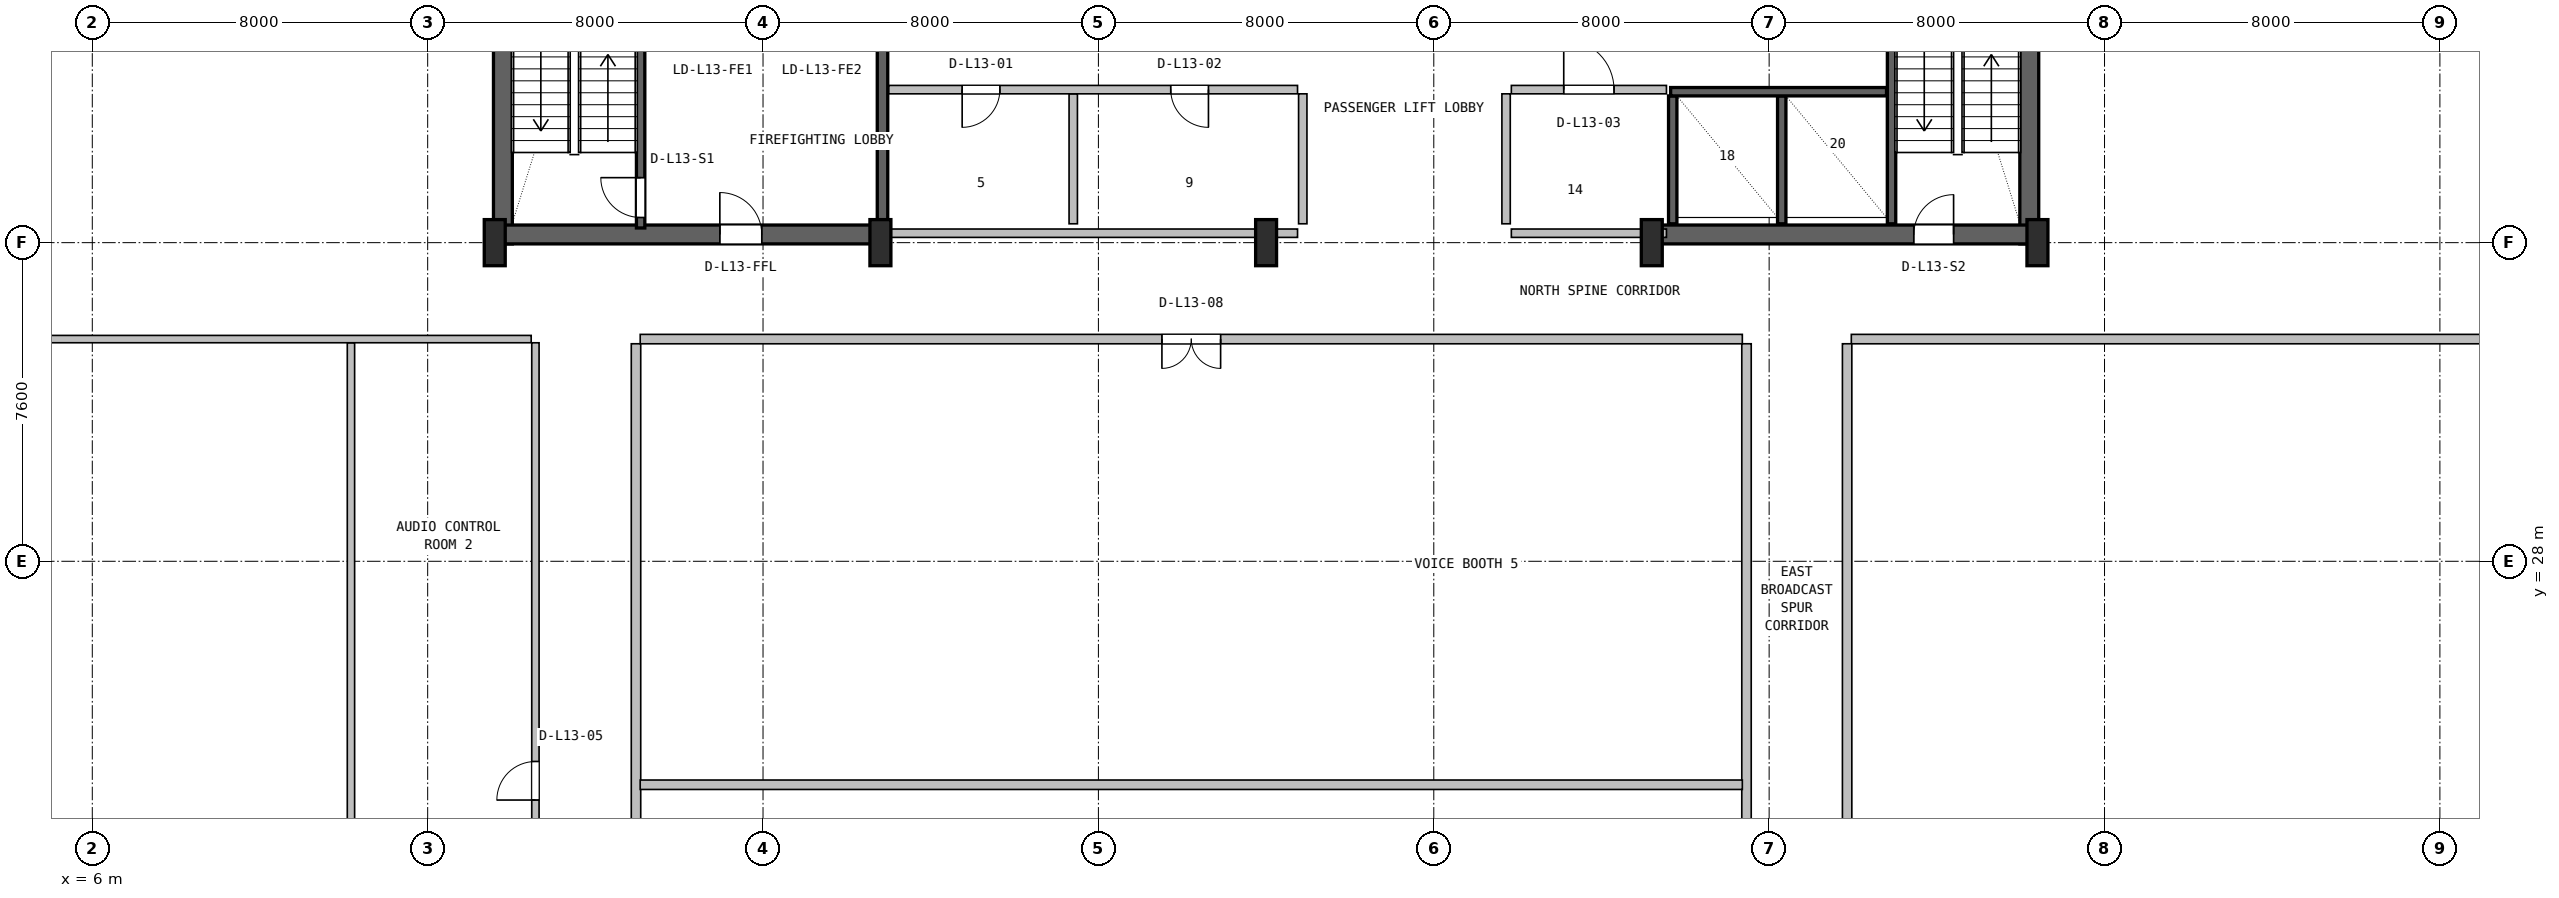
"""IFC4 building model, lengths in metres.
Left out: names, types, materials, properties, quantities, classifications, styles, units other than length and angle.
Written with IfcOpenShell. Run it as: python <this file> out.ifc"""

import sys

from ifc_helpers import new_model, si_unit, direction, frame, frame_2d, origin, origin_2d, place, context, subcontext, project, spatial, rectangle, i_section, extrude, source, transform, mapped, element, fill, save


model = new_model("IFC4")
c1 = context("Model", 3, precision=1e-05, world=origin(), true_north=direction((0.0, 1.0)))
c2 = subcontext(c1, "Body", "Model", "MODEL_VIEW")
j1 = project(units=[si_unit("LENGTHUNIT", "METRE"), si_unit("PLANEANGLEUNIT", "RADIAN")], contexts=[c1])
p1 = place(None, origin())
s1 = spatial("IfcSite", under=j1, at=p1, CompositionType="ELEMENT")
p2 = place(p1, origin())
s2 = spatial("IfcBuilding", under=s1, at=p2, CompositionType="ELEMENT")
p3 = place(p2, frame((0.0, 0.0, 58.8)))
s3 = spatial("IfcBuildingStorey", under=s2, at=p3, CompositionType="ELEMENT", Elevation=58.8)
for number, where, z_axis, x_axis in (
    (1, (15.795, 35.57, 0.0), (0.0, 0.0, 1.0), (0.0, 1.0, 0.0)),
    (2, (52.205, 35.57, 0.0), (0.0, 0.0, 1.0), (0.0, 1.0, 0.0)),
):
    element("IfcWall", number, at=place(p3, frame(where, z_axis=z_axis, x_axis=x_axis)), inside=s3, PredefinedType="SHEAR", context=c2, shape_type="SweptSolid", body=[
        extrude(rectangle(XDim=11.23, YDim=0.45, at=frame_2d((5.615, 0.0))), origin(), (0.0, 0.0, 1.0), 3.65),
    ])
p4 = place(p3, frame((15.57, 35.795, 0.0), z_axis=(0.0, 0.0, 1.0), x_axis=(1.0, 0.0, 0.0)))
e3 = element("IfcWall", 3, at=p4, inside=s3, PredefinedType="SHEAR", context=c2, shape_type="SweptSolid", body=[
    extrude(rectangle(XDim=9.23, YDim=0.45, at=frame_2d((4.615, 0.0))), origin(), (0.0, 0.0, 1.0), 3.65),
])
p5 = place(p4, frame((5.4, 0.0, 0.0)))
e4 = element("IfcOpeningElement", 4, at=p5, cuts=e3, PredefinedType="OPENING", context=c2, shape_type="SweptSolid", body=[
    extrude(rectangle(XDim=1.0, YDim=2.1, at=frame_2d((0.5, 1.05))), frame((0.0, 0.235, 0.0), z_axis=(0.0, -1.0, 0.0), x_axis=(1.0, 0.0, 0.0)), (0.0, 0.0, 1.0), 0.47),
])
p6 = place(p3, frame((43.2, 35.795, 0.0), z_axis=(0.0, 0.0, 1.0), x_axis=(1.0, 0.0, 0.0)))
e5 = element("IfcWall", 5, at=p6, inside=s3, PredefinedType="SHEAR", context=c2, shape_type="SweptSolid", body=[
    extrude(rectangle(XDim=9.23, YDim=0.45, at=frame_2d((4.615, 0.0))), origin(), (0.0, 0.0, 1.0), 3.65),
])
p7 = place(p6, frame((6.25, 0.0, 0.0)))
e6 = element("IfcOpeningElement", 6, at=p7, cuts=e5, PredefinedType="OPENING", context=c2, shape_type="SweptSolid", body=[
    extrude(rectangle(XDim=0.95, YDim=2.1, at=frame_2d((0.475, 1.05))), frame((0.0, 0.235, 0.0), z_axis=(0.0, -1.0, 0.0), x_axis=(1.0, 0.0, 0.0)), (0.0, 0.0, 1.0), 0.47),
])
m1 = source(origin(), c2, "Body", "SweptSolid", [
    extrude(i_section(OverallWidth=0.5, OverallDepth=1.1, WebThickness=0.018, FlangeThickness=0.032, FilletRadius=0.018, at=origin_2d()), origin(), (0.0, 0.0, 1.0), 3.9),
])
for number, where, z_axis, x_axis in (
    (7, (15.6, 35.6, 0.0), (0.0, 0.0, 1.0), (1.0, 0.0, 0.0)),
    (8, (24.8, 35.6, 0.0), (0.0, 0.0, 1.0), (1.0, 0.0, 0.0)),
    (9, (34.0, 35.6, 0.0), (0.0, 0.0, 1.0), (1.0, 0.0, 0.0)),
    (10, (43.2, 35.6, 0.0), (0.0, 0.0, 1.0), (1.0, 0.0, 0.0)),
    (11, (52.4, 35.6, 0.0), (0.0, 0.0, 1.0), (1.0, 0.0, 0.0)),
):
    element("IfcColumn", number, at=place(p3, frame(where, z_axis=z_axis, x_axis=x_axis)), inside=s3, PredefinedType="COLUMN", context=c2, shape_type="MappedRepresentation", body=[
        mapped(m1, transform((0.0, 0.0, 0.0), x_axis=(1.0, 0.0, 0.0), y_axis=(0.0, 1.0, 0.0), z_axis=(0.0, 0.0, 1.0), scale=1.0)),
    ])
p8 = place(p3, frame((19.08, 35.95, 0.0), z_axis=(0.0, 0.0, 1.0), x_axis=(0.0, 1.0, 0.0)))
e12 = element("IfcWall", 12, at=p8, inside=s3, PredefinedType="SHEAR", context=c2, shape_type="SweptSolid", body=[
    extrude(rectangle(XDim=9.65, YDim=0.2, at=frame_2d((4.825, 0.0))), origin(), (0.0, 0.0, 1.0), 3.65),
])
p9 = place(p8, frame((0.25, 0.0, 0.0)))
e13 = element("IfcOpeningElement", 13, at=p9, cuts=e12, PredefinedType="OPENING", context=c2, shape_type="SweptSolid", body=[
    extrude(rectangle(XDim=0.95, YDim=2.1, at=frame_2d((0.475, 1.05))), frame((0.0, 0.11, 0.0), z_axis=(0.0, -1.0, 0.0), x_axis=(1.0, 0.0, 0.0)), (0.0, 0.0, 1.0), 0.22),
])
p10 = place(p3, frame((24.85, 36.05, 0.0), z_axis=(0.0, 0.0, 1.0), x_axis=(0.0, 1.0, 0.0)))
e14 = element("IfcWall", 14, at=p10, inside=s3, PredefinedType="SHEAR", context=c2, shape_type="SweptSolid", body=[
    extrude(rectangle(XDim=10.45, YDim=0.25, at=frame_2d((5.225, 0.0))), origin(), (0.0, 0.0, 1.0), 3.65),
])
p11 = place(p3, frame((48.92, 36.05, 0.0), z_axis=(0.0, 0.0, 1.0), x_axis=(0.0, 1.0, 0.0)))
e15 = element("IfcWall", 15, at=p11, inside=s3, PredefinedType="SHEAR", context=c2, shape_type="SweptSolid", body=[
    extrude(rectangle(XDim=10.5, YDim=0.2, at=frame_2d((5.25, 0.0))), origin(), (0.0, 0.0, 1.0), 3.65),
])
for number, where, z_axis, x_axis in (
    (16, (43.7, 36.05, 0.0), (0.0, 0.0, 1.0), (0.0, 1.0, 0.0)),
    (17, (46.3, 36.05, 0.0), (0.0, 0.0, 1.0), (0.0, 1.0, 0.0)),
):
    element("IfcWall", number, at=place(p3, frame(where, z_axis=z_axis, x_axis=x_axis)), inside=s3, PredefinedType="SHEAR", context=c2, shape_type="SweptSolid", body=[
        extrude(rectangle(XDim=3.05, YDim=0.2, at=frame_2d((1.525, 0.0))), origin(), (0.0, 0.0, 1.0), 3.65),
    ])
p12 = place(p3, frame((43.65, 39.2, 0.0), z_axis=(0.0, 0.0, 1.0), x_axis=(1.0, 0.0, 0.0)))
e18 = element("IfcWall", 18, at=p12, inside=s3, PredefinedType="SHEAR", context=c2, shape_type="SweptSolid", body=[
    extrude(rectangle(XDim=5.15, YDim=0.2, at=frame_2d((2.575, 0.0))), origin(), (0.0, 0.0, 1.0), 3.65),
])
p13 = place(p3, frame((25.0, 35.825, 0.0), z_axis=(0.0, 0.0, 1.0), x_axis=(1.0, 0.0, 0.0)))
e19 = element("IfcWall", 19, at=p13, inside=s3, PredefinedType="PLUMBINGWALL", context=c2, shape_type="SweptSolid", body=[
    extrude(rectangle(XDim=9.75, YDim=0.2, at=frame_2d((4.875, 0.0))), origin(), (0.0, 0.0, 1.0), 2.425),
])
p14 = place(p3, frame((29.4, 36.05, 0.0), z_axis=(0.0, 0.0, 1.0), x_axis=(0.0, 1.0, 0.0)))
e20 = element("IfcWall", 20, at=p14, inside=s3, PredefinedType="PLUMBINGWALL", context=c2, shape_type="SweptSolid", body=[
    extrude(rectangle(XDim=3.1, YDim=0.2, at=frame_2d((1.55, 0.0))), origin(), (0.0, 0.0, 1.0), 3.63),
])
p15 = place(p3, frame((25.0, 39.25, 0.0), z_axis=(0.0, 0.0, 1.0), x_axis=(1.0, 0.0, 0.0)))
e21 = element("IfcWall", 21, at=p15, inside=s3, PredefinedType="PLUMBINGWALL", context=c2, shape_type="SweptSolid", body=[
    extrude(rectangle(XDim=9.75, YDim=0.2, at=frame_2d((4.875, 0.0))), origin(), (0.0, 0.0, 1.0), 3.63),
])
p16 = place(p15, frame((1.75, 0.0, 0.0)))
e22 = element("IfcOpeningElement", 22, at=p16, cuts=e21, PredefinedType="OPENING", context=c2, shape_type="SweptSolid", body=[
    extrude(rectangle(XDim=0.9, YDim=2.06, at=frame_2d((0.45, 1.03))), frame((0.0, 0.11, 0.0), z_axis=(0.0, -1.0, 0.0), x_axis=(1.0, 0.0, 0.0)), (0.0, 0.0, 1.0), 0.22),
])
p17 = place(p15, frame((6.725, 0.0, 0.0)))
e23 = element("IfcOpeningElement", 23, at=p17, cuts=e21, PredefinedType="OPENING", context=c2, shape_type="SweptSolid", body=[
    extrude(rectangle(XDim=0.9, YDim=2.06, at=frame_2d((0.45, 1.03))), frame((0.0, 0.11, 0.0), z_axis=(0.0, -1.0, 0.0), x_axis=(1.0, 0.0, 0.0)), (0.0, 0.0, 1.0), 0.22),
])
p18 = place(p3, frame((34.875, 36.05, 0.0), z_axis=(0.0, 0.0, 1.0), x_axis=(0.0, 1.0, 0.0)))
e24 = element("IfcWall", 24, at=p18, inside=s3, PredefinedType="PLUMBINGWALL", context=c2, shape_type="SweptSolid", body=[
    extrude(rectangle(XDim=3.1, YDim=0.2, at=frame_2d((1.55, 0.0))), origin(), (0.0, 0.0, 1.0), 3.63),
])
p19 = place(p3, frame((39.85, 35.825, 0.0), z_axis=(0.0, 0.0, 1.0), x_axis=(1.0, 0.0, 0.0)))
e25 = element("IfcWall", 25, at=p19, inside=s3, PredefinedType="SOLIDWALL", context=c2, shape_type="SweptSolid", body=[
    extrude(rectangle(XDim=3.7, YDim=0.2, at=frame_2d((1.85, 0.0))), origin(), (0.0, 0.0, 1.0), 2.425),
])
p20 = place(p3, frame((39.85, 39.25, 0.0), z_axis=(0.0, 0.0, 1.0), x_axis=(1.0, 0.0, 0.0)))
e26 = element("IfcWall", 26, at=p20, inside=s3, PredefinedType="SOLIDWALL", context=c2, shape_type="SweptSolid", body=[
    extrude(rectangle(XDim=3.7, YDim=0.2, at=frame_2d((1.85, 0.0))), origin(), (0.0, 0.0, 1.0), 3.63),
])
p21 = place(p20, frame((1.25, 0.0, 0.0)))
e27 = element("IfcOpeningElement", 27, at=p21, cuts=e26, PredefinedType="OPENING", context=c2, shape_type="SweptSolid", body=[
    extrude(rectangle(XDim=1.2, YDim=2.1, at=frame_2d((0.6, 1.05))), frame((0.0, 0.11, 0.0), z_axis=(0.0, -1.0, 0.0), x_axis=(1.0, 0.0, 0.0)), (0.0, 0.0, 1.0), 0.22),
])
p22 = place(p3, frame((39.725, 36.05, 0.0), z_axis=(0.0, 0.0, 1.0), x_axis=(0.0, 1.0, 0.0)))
e28 = element("IfcWall", 28, at=p22, inside=s3, PredefinedType="SOLIDWALL", context=c2, shape_type="SweptSolid", body=[
    extrude(rectangle(XDim=3.1, YDim=0.2, at=frame_2d((1.55, 0.0))), origin(), (0.0, 0.0, 1.0), 3.63),
])
p23 = place(p3, frame((16.57, 1.38, 0.0), z_axis=(0.0, 0.0, 1.0), x_axis=(0.0, 1.0, 0.0)))
e29 = element("IfcWall", 29, at=p23, inside=s3, PredefinedType="PARTITIONING", context=c2, shape_type="SweptSolid", body=[
    extrude(rectangle(XDim=31.832, YDim=0.175, at=frame_2d((15.916, 0.0))), origin(), (0.0, 0.0, 1.0), 3.208),
])
p24 = place(p23, frame((5.38, 0.0, 0.0)))
e30 = element("IfcOpeningElement", 30, at=p24, cuts=e29, PredefinedType="OPENING", context=c2, shape_type="SweptSolid", body=[
    extrude(rectangle(XDim=1.05, YDim=2.1, at=frame_2d((0.525, 1.05))), frame((0.0, 0.098, 0.0), z_axis=(0.0, -1.0, 0.0), x_axis=(1.0, 0.0, 0.0)), (0.0, 0.0, 1.0), 0.195),
])
p25 = place(p23, frame((20.925, 0.0, 0.0)))
e31 = element("IfcOpeningElement", 31, at=p25, cuts=e29, PredefinedType="OPENING", context=c2, shape_type="SweptSolid", body=[
    extrude(rectangle(XDim=0.92, YDim=2.08, at=frame_2d((0.46, 1.04))), frame((0.0, 0.098, 0.0), z_axis=(0.0, -1.0, 0.0), x_axis=(1.0, 0.0, 0.0)), (0.0, 0.0, 1.0), 0.195),
])
p26 = place(p3, frame((12.17, 12.218, 0.0), z_axis=(0.0, 0.0, 1.0), x_axis=(0.0, 1.0, 0.0)))
e32 = element("IfcWall", 32, at=p26, inside=s3, PredefinedType="PARTITIONING", context=c2, shape_type="SweptSolid", body=[
    extrude(rectangle(XDim=20.994, YDim=0.175, at=frame_2d((10.497, 0.0))), origin(), (0.0, 0.0, 1.0), 3.322),
])
p27 = place(p3, frame((2.18, 33.3, 0.0), z_axis=(0.0, 0.0, 1.0), x_axis=(1.0, 0.0, 0.0)))
e33 = element("IfcWall", 33, at=p27, inside=s3, PredefinedType="PARTITIONING", context=c2, shape_type="SweptSolid", body=[
    extrude(rectangle(XDim=14.29, YDim=0.175, at=frame_2d((7.145, 0.0))), origin(), (0.0, 0.0, 1.0), 3.208),
])
p28 = place(p3, frame((45.46, 1.38, 0.0), z_axis=(0.0, 0.0, 1.0), x_axis=(0.0, 1.0, 0.0)))
e34 = element("IfcWall", 34, at=p28, inside=s3, PredefinedType="PARTITIONING", context=c2, shape_type="SweptSolid", body=[
    extrude(rectangle(XDim=31.808, YDim=0.225, at=frame_2d((15.904, 0.0))), origin(), (0.0, 0.0, 1.0), 3.208),
])
p29 = place(p28, frame((6.8, 0.0, 0.0)))
e35 = element("IfcOpeningElement", 35, at=p29, cuts=e34, PredefinedType="OPENING", context=c2, shape_type="SweptSolid", body=[
    extrude(rectangle(XDim=1.4, YDim=2.12, at=frame_2d((0.7, 1.06))), frame((0.0, 0.123, 0.0), z_axis=(0.0, -1.0, 0.0), x_axis=(1.0, 0.0, 0.0)), (0.0, 0.0, 1.0), 0.245),
])
p30 = place(p28, frame((17.015, 0.0, 0.0)))
e36 = element("IfcOpeningElement", 36, at=p30, cuts=e34, PredefinedType="OPENING", context=c2, shape_type="SweptSolid", body=[
    extrude(rectangle(XDim=1.4, YDim=2.12, at=frame_2d((0.7, 1.06))), frame((0.0, 0.123, 0.0), z_axis=(0.0, -1.0, 0.0), x_axis=(1.0, 0.0, 0.0)), (0.0, 0.0, 1.0), 0.245),
])
p31 = place(p3, frame((18.97, 1.38, 0.0), z_axis=(0.0, 0.0, 1.0), x_axis=(0.0, 1.0, 0.0)))
e37 = element("IfcWall", 37, at=p31, inside=s3, PredefinedType="PARTITIONING", context=c2, shape_type="SweptSolid", body=[
    extrude(rectangle(XDim=31.808, YDim=0.225, at=frame_2d((15.904, 0.0))), origin(), (0.0, 0.0, 1.0), 3.208),
])
p32 = place(p3, frame((19.07, 22.67, 0.0), z_axis=(0.0, 0.0, 1.0), x_axis=(1.0, 0.0, 0.0)))
e38 = element("IfcWall", 38, at=p32, inside=s3, PredefinedType="PARTITIONING", context=c2, shape_type="SweptSolid", body=[
    extrude(rectangle(XDim=26.29, YDim=0.225, at=frame_2d((13.145, 0.0))), origin(), (0.0, 0.0, 1.0), 2.852),
])
p33 = place(p3, frame((19.07, 33.3, 0.0), z_axis=(0.0, 0.0, 1.0), x_axis=(1.0, 0.0, 0.0)))
e39 = element("IfcWall", 39, at=p33, inside=s3, PredefinedType="PARTITIONING", context=c2, shape_type="SweptSolid", body=[
    extrude(rectangle(XDim=26.29, YDim=0.225, at=frame_2d((13.145, 0.0))), origin(), (0.0, 0.0, 1.0), 2.852),
])
p34 = place(p33, frame((12.445, 0.0, 0.0)))
e40 = element("IfcOpeningElement", 40, at=p34, cuts=e39, PredefinedType="OPENING", context=c2, shape_type="SweptSolid", body=[
    extrude(rectangle(XDim=1.4, YDim=2.12, at=frame_2d((0.7, 1.06))), frame((0.0, 0.123, 0.0), z_axis=(0.0, -1.0, 0.0), x_axis=(1.0, 0.0, 0.0)), (0.0, 0.0, 1.0), 0.245),
])
p35 = place(p3, frame((47.96, 33.3, 0.0), z_axis=(0.0, 0.0, 1.0), x_axis=(1.0, 0.0, 0.0)))
e41 = element("IfcWall", 41, at=p35, inside=s3, PredefinedType="PARTITIONING", context=c2, shape_type="SweptSolid", body=[
    extrude(rectangle(XDim=17.86, YDim=0.225, at=frame_2d((8.93, 0.0))), origin(), (0.0, 0.0, 1.0), 3.208),
])
p36 = place(p3, frame((47.86, 2.55, 0.0), z_axis=(0.0, 0.0, 1.0), x_axis=(0.0, 1.0, 0.0)))
e42 = element("IfcWall", 42, at=p36, inside=s3, PredefinedType="PARTITIONING", context=c2, shape_type="SweptSolid", body=[
    extrude(rectangle(XDim=30.638, YDim=0.225, at=frame_2d((15.319, 0.0))), origin(), (0.0, 0.0, 1.0), 3.322),
])
p37 = place(p36, frame((14.859, 0.0, 0.0)))
e43 = element("IfcOpeningElement", 43, at=p37, cuts=e42, PredefinedType="OPENING", context=c2, shape_type="SweptSolid", body=[
    extrude(rectangle(XDim=0.92, YDim=2.08, at=frame_2d((0.46, 1.04))), frame((0.0, 0.123, 0.0), z_axis=(0.0, -1.0, 0.0), x_axis=(1.0, 0.0, 0.0)), (0.0, 0.0, 1.0), 0.245),
])
m2 = source(origin(), c2, "Body", "SweptSolid", [
    extrude(rectangle(XDim=0.95, YDim=2.1, at=frame_2d((0.475, 1.05))), frame((0.0, 0.025, 0.0), z_axis=(0.0, -1.0, 0.0), x_axis=(1.0, 0.0, 0.0)), (0.0, 0.0, 1.0), 0.05),
])
p38 = place(p9, origin())
e44 = element("IfcDoor", 44, at=p38, inside=s3, OperationType="SINGLE_SWING_RIGHT", PredefinedType="DOOR", context=c2, shape_type="MappedRepresentation", body=[
    mapped(m2, transform((0.0, 0.0, 0.0), x_axis=(1.0, 0.0, 0.0), y_axis=(0.0, 1.0, 0.0), z_axis=(0.0, 0.0, 1.0), scale=1.0)),
])
fill(e13, e44)
m3 = source(origin(), c2, "Body", "SweptSolid", [
    extrude(rectangle(XDim=1.0, YDim=2.1, at=frame_2d((0.5, 1.05))), frame((0.0, 0.025, 0.0), z_axis=(0.0, -1.0, 0.0), x_axis=(1.0, 0.0, 0.0)), (0.0, 0.0, 1.0), 0.05),
])
p39 = place(p5, origin())
e45 = element("IfcDoor", 45, at=p39, inside=s3, OperationType="SINGLE_SWING_LEFT", PredefinedType="DOOR", context=c2, shape_type="MappedRepresentation", body=[
    mapped(m3, transform((0.0, 0.0, 0.0), x_axis=(1.0, 0.0, 0.0), y_axis=(0.0, 1.0, 0.0), z_axis=(0.0, 0.0, 1.0), scale=1.0)),
])
fill(e4, e45)
p40 = place(p7, origin())
e46 = element("IfcDoor", 46, at=p40, inside=s3, OperationType="SINGLE_SWING_RIGHT", PredefinedType="DOOR", context=c2, shape_type="MappedRepresentation", body=[
    mapped(m2, transform((0.0, 0.0, 0.0), x_axis=(1.0, 0.0, 0.0), y_axis=(0.0, 1.0, 0.0), z_axis=(0.0, 0.0, 1.0), scale=1.0)),
])
fill(e6, e46)
m4 = source(origin(), c2, "Body", "SweptSolid", [
    extrude(rectangle(XDim=0.9, YDim=2.06, at=frame_2d((0.45, 1.03))), frame((0.0, 0.025, 0.0), z_axis=(0.0, -1.0, 0.0), x_axis=(1.0, 0.0, 0.0)), (0.0, 0.0, 1.0), 0.05),
])
p41 = place(p16, frame((0.9, 0.0, 0.0), z_axis=(0.0, 0.0, 1.0), x_axis=(-1.0, 0.0, 0.0)))
e47 = element("IfcDoor", 47, at=p41, inside=s3, OperationType="SINGLE_SWING_LEFT", PredefinedType="DOOR", context=c2, shape_type="MappedRepresentation", body=[
    mapped(m4, transform((0.0, 0.0, 0.0), x_axis=(1.0, 0.0, 0.0), y_axis=(0.0, 1.0, 0.0), z_axis=(0.0, 0.0, 1.0), scale=1.0)),
])
fill(e22, e47)
p42 = place(p17, frame((0.9, 0.0, 0.0), z_axis=(0.0, 0.0, 1.0), x_axis=(-1.0, 0.0, 0.0)))
e48 = element("IfcDoor", 48, at=p42, inside=s3, OperationType="SINGLE_SWING_RIGHT", PredefinedType="DOOR", context=c2, shape_type="MappedRepresentation", body=[
    mapped(m4, transform((0.0, 0.0, 0.0), x_axis=(1.0, 0.0, 0.0), y_axis=(0.0, 1.0, 0.0), z_axis=(0.0, 0.0, 1.0), scale=1.0)),
])
fill(e23, e48)
m5 = source(origin(), c2, "Body", "SweptSolid", [
    extrude(rectangle(XDim=1.2, YDim=2.1, at=frame_2d((0.6, 1.05))), frame((0.0, 0.025, 0.0), z_axis=(0.0, -1.0, 0.0), x_axis=(1.0, 0.0, 0.0)), (0.0, 0.0, 1.0), 0.05),
])
p43 = place(p21, origin())
e49 = element("IfcDoor", 49, at=p43, inside=s3, OperationType="SINGLE_SWING_LEFT", PredefinedType="DOOR", context=c2, shape_type="MappedRepresentation", body=[
    mapped(m5, transform((0.0, 0.0, 0.0), x_axis=(1.0, 0.0, 0.0), y_axis=(0.0, 1.0, 0.0), z_axis=(0.0, 0.0, 1.0), scale=1.0)),
])
fill(e27, e49)
m6 = source(origin(), c2, "Body", "SweptSolid", [
    extrude(rectangle(XDim=0.92, YDim=2.08, at=frame_2d((0.46, 1.04))), frame((0.0, 0.025, 0.0), z_axis=(0.0, -1.0, 0.0), x_axis=(1.0, 0.0, 0.0)), (0.0, 0.0, 1.0), 0.05),
])
p44 = place(p25, origin())
e50 = element("IfcDoor", 50, at=p44, inside=s3, OperationType="SINGLE_SWING_LEFT", PredefinedType="DOOR", context=c2, shape_type="MappedRepresentation", body=[
    mapped(m6, transform((0.0, 0.0, 0.0), x_axis=(1.0, 0.0, 0.0), y_axis=(0.0, 1.0, 0.0), z_axis=(0.0, 0.0, 1.0), scale=1.0)),
])
fill(e31, e50)
m7 = source(origin(), c2, "Body", "SweptSolid", [
    extrude(rectangle(XDim=1.4, YDim=2.12, at=frame_2d((0.7, 1.06))), frame((0.0, 0.025, 0.0), z_axis=(0.0, -1.0, 0.0), x_axis=(1.0, 0.0, 0.0)), (0.0, 0.0, 1.0), 0.05),
])
p45 = place(p34, frame((1.4, 0.0, 0.0), z_axis=(0.0, 0.0, 1.0), x_axis=(-1.0, 0.0, 0.0)))
e51 = element("IfcDoor", 51, at=p45, inside=s3, OperationType="DOUBLE_DOOR_SINGLE_SWING", PredefinedType="DOOR", context=c2, shape_type="MappedRepresentation", body=[
    mapped(m7, transform((0.0, 0.0, 0.0), x_axis=(1.0, 0.0, 0.0), y_axis=(0.0, 1.0, 0.0), z_axis=(0.0, 0.0, 1.0), scale=1.0)),
])
fill(e40, e51)
save(model, sys.argv[1])
